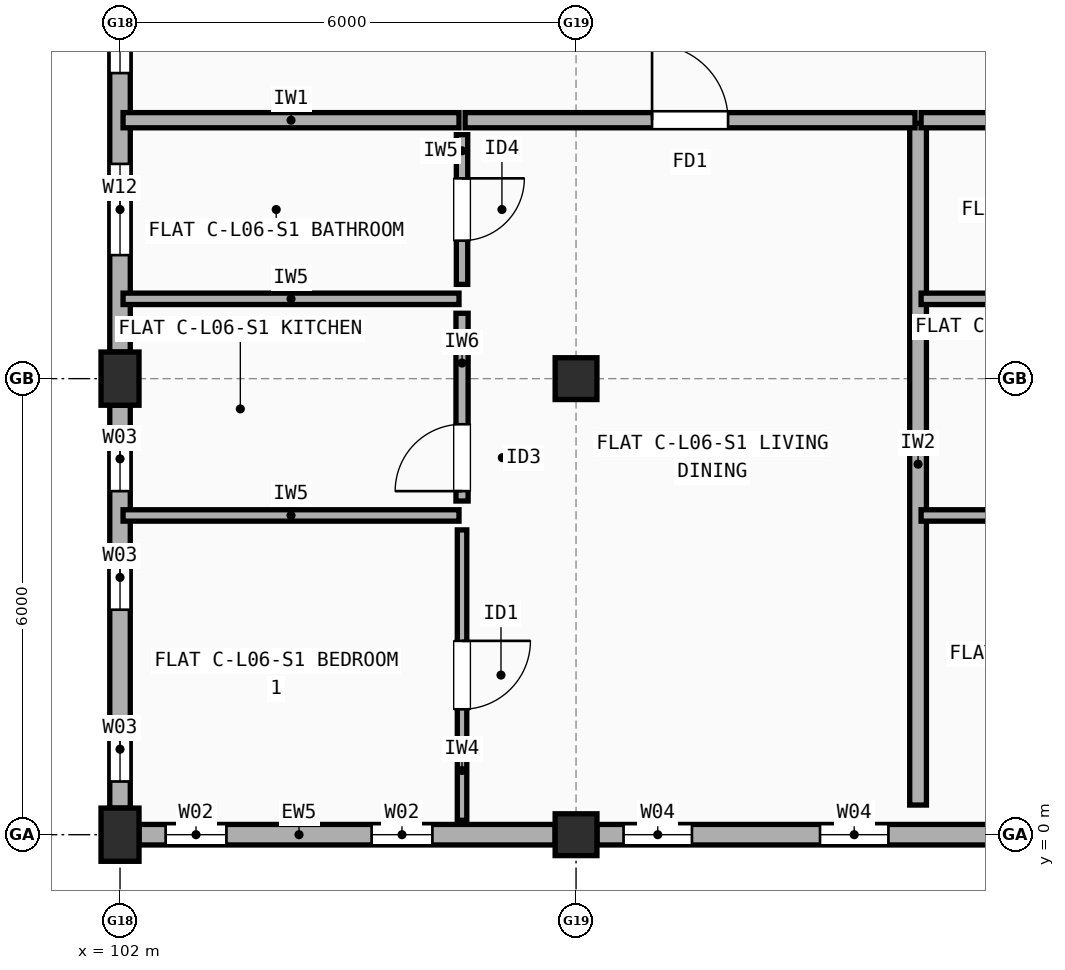
"""IFC4 building model, lengths in metres.
Left out: names, types, materials, properties, quantities, classifications, styles, units other than length and angle.
Written with IfcOpenShell. Run it as: python <this file> out.ifc"""

import sys

from ifc_helpers import new_model, si_unit, direction, frame, frame_2d, origin, origin_2d, place, context, subcontext, project, spatial, rectangle, extrude, element, fill, save


model = new_model("IFC4")
c1 = context("Model", 3, precision=1e-05, world=origin(), true_north=direction((0.0, 1.0)))
c2 = subcontext(c1, "Body", "Model", "MODEL_VIEW")
j1 = project(units=[si_unit("LENGTHUNIT", "METRE"), si_unit("PLANEANGLEUNIT", "RADIAN")], contexts=[c1])
p1 = place(None, origin())
s1 = spatial("IfcSite", under=j1, at=p1, CompositionType="ELEMENT")
p2 = place(p1, origin())
s2 = spatial("IfcBuilding", under=s1, at=p2, CompositionType="ELEMENT")
p3 = place(p2, frame((0.0, 0.0, 20.5)))
s3 = spatial("IfcBuildingStorey", under=s2, at=p3, CompositionType="ELEMENT", Elevation=20.5)
for number, where, z_axis, x_axis in (
    (1, (102.0, 0.0, 0.0), (0.0, 0.0, 1.0), (1.0, 0.0, 0.0)),
    (2, (102.0, 6.0, 0.0), (0.0, 0.0, 1.0), (1.0, 0.0, 0.0)),
):
    element("IfcColumn", number, at=place(p3, frame(where, z_axis=z_axis, x_axis=x_axis)), inside=s3, PredefinedType="COLUMN", context=c2, shape_type="SweptSolid", body=[
        extrude(rectangle(XDim=0.5, YDim=0.7, at=origin_2d()), origin(), (0.0, 0.0, 1.0), 2.97),
    ])
for number, where, z_axis, x_axis in (
    (3, (108.0, 0.0, 0.0), (0.0, 0.0, 1.0), (1.0, 0.0, 0.0)),
    (4, (108.0, 6.0, 0.0), (0.0, 0.0, 1.0), (1.0, 0.0, 0.0)),
):
    element("IfcColumn", number, at=place(p3, frame(where, z_axis=z_axis, x_axis=x_axis)), inside=s3, PredefinedType="COLUMN", context=c2, shape_type="SweptSolid", body=[
        extrude(rectangle(XDim=0.55, YDim=0.55, at=origin_2d()), origin(), (0.0, 0.0, 1.0), 2.97),
    ])
p4 = place(p3, frame((102.25, 0.0, 0.0), z_axis=(0.0, 0.0, 1.0), x_axis=(1.0, 0.0, 0.0)))
e5 = element("IfcWall", 5, at=p4, inside=s3, PredefinedType="STANDARD", context=c2, shape_type="SweptSolid", body=[
    extrude(rectangle(XDim=5.475, YDim=0.27, at=frame_2d((2.738, 0.0))), origin(), (0.0, 0.0, 1.0), 2.452),
])
p5 = place(p4, frame((0.35, 0.0, 0.9)))
e6 = element("IfcOpeningElement", 6, at=p5, cuts=e5, PredefinedType="OPENING", context=c2, shape_type="SweptSolid", body=[
    extrude(rectangle(XDim=0.8, YDim=1.2, at=frame_2d((0.4, 0.6))), frame((0.0, 0.145, 0.0), z_axis=(0.0, -1.0, 0.0), x_axis=(1.0, 0.0, 0.0)), (0.0, 0.0, 1.0), 0.29),
])
p6 = place(p4, frame((3.06, 0.0, 0.9)))
e7 = element("IfcOpeningElement", 7, at=p6, cuts=e5, PredefinedType="OPENING", context=c2, shape_type="SweptSolid", body=[
    extrude(rectangle(XDim=0.8, YDim=1.2, at=frame_2d((0.4, 0.6))), frame((0.0, 0.145, 0.0), z_axis=(0.0, -1.0, 0.0), x_axis=(1.0, 0.0, 0.0)), (0.0, 0.0, 1.0), 0.29),
])
p7 = place(p3, frame((108.275, 0.0, 0.0), z_axis=(0.0, 0.0, 1.0), x_axis=(1.0, 0.0, 0.0)))
e8 = element("IfcWall", 8, at=p7, inside=s3, PredefinedType="STANDARD", context=c2, shape_type="SweptSolid", body=[
    extrude(rectangle(XDim=5.45, YDim=0.27, at=frame_2d((2.725, 0.0))), origin(), (0.0, 0.0, 1.0), 2.452),
])
p8 = place(p7, frame((0.35, 0.0, 0.9)))
e9 = element("IfcOpeningElement", 9, at=p8, cuts=e8, PredefinedType="OPENING", context=c2, shape_type="SweptSolid", body=[
    extrude(rectangle(XDim=0.9, YDim=1.3, at=frame_2d((0.45, 0.65))), frame((0.0, 0.145, 0.0), z_axis=(0.0, -1.0, 0.0), x_axis=(1.0, 0.0, 0.0)), (0.0, 0.0, 1.0), 0.29),
])
p9 = place(p7, frame((2.935, 0.0, 0.9)))
e10 = element("IfcOpeningElement", 10, at=p9, cuts=e8, PredefinedType="OPENING", context=c2, shape_type="SweptSolid", body=[
    extrude(rectangle(XDim=0.9, YDim=1.3, at=frame_2d((0.45, 0.65))), frame((0.0, 0.145, 0.0), z_axis=(0.0, -1.0, 0.0), x_axis=(1.0, 0.0, 0.0)), (0.0, 0.0, 1.0), 0.29),
])
p10 = place(p3, frame((102.0, 11.65, 0.0), z_axis=(0.0, 0.0, 1.0), x_axis=(0.0, -1.0, 0.0)))
e11 = element("IfcWall", 11, at=p10, inside=s3, PredefinedType="STANDARD", context=c2, shape_type="SweptSolid", body=[
    extrude(rectangle(XDim=5.3, YDim=0.27, at=frame_2d((2.65, 0.0))), origin(), (0.0, 0.0, 1.0), 2.452),
])
p11 = place(p10, frame((0.58, 0.0, 0.9)))
e12 = element("IfcOpeningElement", 12, at=p11, cuts=e11, PredefinedType="OPENING", context=c2, shape_type="SweptSolid", body=[
    extrude(rectangle(XDim=1.05, YDim=1.35, at=frame_2d((0.525, 0.675))), frame((0.0, 0.145, 0.0), z_axis=(0.0, -1.0, 0.0), x_axis=(1.0, 0.0, 0.0)), (0.0, 0.0, 1.0), 0.29),
])
p12 = place(p10, frame((2.825, 0.0, 0.9)))
e13 = element("IfcOpeningElement", 13, at=p12, cuts=e11, PredefinedType="OPENING", context=c2, shape_type="SweptSolid", body=[
    extrude(rectangle(XDim=1.2, YDim=1.35, at=frame_2d((0.6, 0.675))), frame((0.0, 0.145, 0.0), z_axis=(0.0, -1.0, 0.0), x_axis=(1.0, 0.0, 0.0)), (0.0, 0.0, 1.0), 0.29),
])
p13 = place(p3, frame((102.0, 5.65, 0.0), z_axis=(0.0, 0.0, 1.0), x_axis=(0.0, -1.0, 0.0)))
e14 = element("IfcWall", 14, at=p13, inside=s3, PredefinedType="STANDARD", context=c2, shape_type="SweptSolid", body=[
    extrude(rectangle(XDim=5.3, YDim=0.27, at=frame_2d((2.65, 0.0))), origin(), (0.0, 0.0, 1.0), 2.452),
])
p14 = place(p13, frame((0.28, 0.0, 0.9)))
e15 = element("IfcOpeningElement", 15, at=p14, cuts=e14, PredefinedType="OPENING", context=c2, shape_type="SweptSolid", body=[
    extrude(rectangle(XDim=0.85, YDim=1.25, at=frame_2d((0.425, 0.625))), frame((0.0, 0.145, 0.0), z_axis=(0.0, -1.0, 0.0), x_axis=(1.0, 0.0, 0.0)), (0.0, 0.0, 1.0), 0.29),
])
p15 = place(p13, frame((1.84, 0.0, 0.9)))
e16 = element("IfcOpeningElement", 16, at=p15, cuts=e14, PredefinedType="OPENING", context=c2, shape_type="SweptSolid", body=[
    extrude(rectangle(XDim=0.85, YDim=1.25, at=frame_2d((0.425, 0.625))), frame((0.0, 0.145, 0.0), z_axis=(0.0, -1.0, 0.0), x_axis=(1.0, 0.0, 0.0)), (0.0, 0.0, 1.0), 0.29),
])
p16 = place(p13, frame((4.1, 0.0, 0.9)))
e17 = element("IfcOpeningElement", 17, at=p16, cuts=e14, PredefinedType="OPENING", context=c2, shape_type="SweptSolid", body=[
    extrude(rectangle(XDim=0.85, YDim=1.25, at=frame_2d((0.425, 0.625))), frame((0.0, 0.145, 0.0), z_axis=(0.0, -1.0, 0.0), x_axis=(1.0, 0.0, 0.0)), (0.0, 0.0, 1.0), 0.29),
])
p17 = place(p3, frame((112.5, 0.39, 0.0), z_axis=(0.0, 0.0, 1.0), x_axis=(0.0, 1.0, 0.0)))
e18 = element("IfcWall", 18, at=p17, inside=s3, PredefinedType="SOLIDWALL", context=c2, shape_type="SweptSolid", body=[
    extrude(rectangle(XDim=8.97, YDim=0.22, at=frame_2d((4.485, 0.0))), origin(), (0.0, 0.0, 1.0), 2.452),
])
p18 = place(p3, frame((102.04, 9.4, 0.0), z_axis=(0.0, 0.0, 1.0), x_axis=(1.0, 0.0, 0.0)))
e19 = element("IfcWall", 19, at=p18, inside=s3, PredefinedType="SOLIDWALL", context=c2, shape_type="SweptSolid", body=[
    extrude(rectangle(XDim=4.42, YDim=0.2, at=frame_2d((2.21, 0.0))), origin(), (0.0, 0.0, 1.0), 2.452),
])
p19 = place(p3, frame((106.54, 9.4, 0.0), z_axis=(0.0, 0.0, 1.0), x_axis=(1.0, 0.0, 0.0)))
e20 = element("IfcWall", 20, at=p19, inside=s3, PredefinedType="SOLIDWALL", context=c2, shape_type="SweptSolid", body=[
    extrude(rectangle(XDim=5.92, YDim=0.2, at=frame_2d((2.96, 0.0))), origin(), (0.0, 0.0, 1.0), 2.548),
])
p20 = place(p19, frame((2.46, 0.0, 0.0)))
e21 = element("IfcOpeningElement", 21, at=p20, cuts=e20, PredefinedType="OPENING", context=c2, shape_type="SweptSolid", body=[
    extrude(rectangle(XDim=1.0, YDim=2.15, at=frame_2d((0.5, 1.075))), frame((0.0, 0.11, 0.0), z_axis=(0.0, -1.0, 0.0), x_axis=(1.0, 0.0, 0.0)), (0.0, 0.0, 1.0), 0.22),
])
p21 = place(p3, frame((106.5, 0.19, 0.0), z_axis=(0.0, 0.0, 1.0), x_axis=(0.0, 1.0, 0.0)))
e22 = element("IfcWall", 22, at=p21, inside=s3, PredefinedType="PARTITIONING", context=c2, shape_type="SweptSolid", body=[
    extrude(rectangle(XDim=3.82, YDim=0.125, at=frame_2d((1.91, 0.0))), origin(), (0.0, 0.0, 1.0), 2.97),
])
p22 = place(p21, frame((1.46, 0.0, 0.0)))
e23 = element("IfcOpeningElement", 23, at=p22, cuts=e22, PredefinedType="OPENING", context=c2, shape_type="SweptSolid", body=[
    extrude(rectangle(XDim=0.9, YDim=2.1, at=frame_2d((0.45, 1.05))), frame((0.0, 0.073, 0.0), z_axis=(0.0, -1.0, 0.0), x_axis=(1.0, 0.0, 0.0)), (0.0, 0.0, 1.0), 0.145),
])
p23 = place(p3, frame((106.5, 4.39, 0.0), z_axis=(0.0, 0.0, 1.0), x_axis=(0.0, 1.0, 0.0)))
e24 = element("IfcWall", 24, at=p23, inside=s3, PredefinedType="PLUMBINGWALL", context=c2, shape_type="SweptSolid", body=[
    extrude(rectangle(XDim=2.47, YDim=0.16, at=frame_2d((1.235, 0.0))), origin(), (0.0, 0.0, 1.0), 2.452),
])
p24 = place(p23, frame((0.13, 0.0, 0.0)))
e25 = element("IfcOpeningElement", 25, at=p24, cuts=e24, PredefinedType="OPENING", context=c2, shape_type="SweptSolid", body=[
    extrude(rectangle(XDim=0.88, YDim=2.1, at=frame_2d((0.44, 1.05))), frame((0.0, 0.09, 0.0), z_axis=(0.0, -1.0, 0.0), x_axis=(1.0, 0.0, 0.0)), (0.0, 0.0, 1.0), 0.18),
])
p25 = place(p3, frame((106.5, 7.24, 0.0), z_axis=(0.0, 0.0, 1.0), x_axis=(0.0, 1.0, 0.0)))
e26 = element("IfcWall", 26, at=p25, inside=s3, PredefinedType="PARTITIONING", context=c2, shape_type="SweptSolid", body=[
    extrude(rectangle(XDim=1.97, YDim=0.15, at=frame_2d((0.985, 0.0))), origin(), (0.0, 0.0, 1.0), 2.97),
])
p26 = place(p25, frame((0.575, 0.0, 0.0)))
e27 = element("IfcOpeningElement", 27, at=p26, cuts=e26, PredefinedType="OPENING", context=c2, shape_type="SweptSolid", body=[
    extrude(rectangle(XDim=0.82, YDim=2.08, at=frame_2d((0.41, 1.04))), frame((0.0, 0.085, 0.0), z_axis=(0.0, -1.0, 0.0), x_axis=(1.0, 0.0, 0.0)), (0.0, 0.0, 1.0), 0.17),
])
for number, where, z_axis, x_axis in (
    (28, (102.04, 4.2, 0.0), (0.0, 0.0, 1.0), (1.0, 0.0, 0.0)),
    (29, (102.04, 7.05, 0.0), (0.0, 0.0, 1.0), (1.0, 0.0, 0.0)),
):
    element("IfcWall", number, at=place(p3, frame(where, z_axis=z_axis, x_axis=x_axis)), inside=s3, PredefinedType="PARTITIONING", context=c2, shape_type="SweptSolid", body=[
        extrude(rectangle(XDim=4.42, YDim=0.15, at=frame_2d((2.21, 0.0))), origin(), (0.0, 0.0, 1.0), 2.452),
    ])
p27 = place(p3, frame((112.54, 9.4, 0.0), z_axis=(0.0, 0.0, 1.0), x_axis=(1.0, 0.0, 0.0)))
e30 = element("IfcWall", 30, at=p27, inside=s3, PredefinedType="SOLIDWALL", context=c2, shape_type="SweptSolid", body=[
    extrude(rectangle(XDim=4.42, YDim=0.2, at=frame_2d((2.21, 0.0))), origin(), (0.0, 0.0, 1.0), 2.548),
])
p28 = place(p3, frame((112.54, 4.2, 0.0), z_axis=(0.0, 0.0, 1.0), x_axis=(1.0, 0.0, 0.0)))
e31 = element("IfcWall", 31, at=p28, inside=s3, PredefinedType="PARTITIONING", context=c2, shape_type="SweptSolid", body=[
    extrude(rectangle(XDim=4.42, YDim=0.15, at=frame_2d((2.21, 0.0))), origin(), (0.0, 0.0, 1.0), 2.458),
])
p29 = place(p3, frame((112.54, 7.05, 0.0), z_axis=(0.0, 0.0, 1.0), x_axis=(1.0, 0.0, 0.0)))
e32 = element("IfcWall", 32, at=p29, inside=s3, PredefinedType="PARTITIONING", context=c2, shape_type="SweptSolid", body=[
    extrude(rectangle(XDim=4.42, YDim=0.15, at=frame_2d((2.21, 0.0))), origin(), (0.0, 0.0, 1.0), 2.548),
])
p30 = place(p5, origin())
e33 = element("IfcWindow", 33, at=p30, inside=s3, PartitioningType="SINGLE_PANEL", PredefinedType="WINDOW", context=c2, shape_type="SweptSolid", body=[
    extrude(rectangle(XDim=0.8, YDim=1.2, at=frame_2d((0.4, 0.6))), frame((0.0, 0.03, 0.0), z_axis=(0.0, -1.0, 0.0), x_axis=(1.0, 0.0, 0.0)), (0.0, 0.0, 1.0), 0.06),
])
fill(e6, e33)
p31 = place(p6, origin())
e34 = element("IfcWindow", 34, at=p31, inside=s3, PartitioningType="SINGLE_PANEL", PredefinedType="WINDOW", context=c2, shape_type="SweptSolid", body=[
    extrude(rectangle(XDim=0.8, YDim=1.2, at=frame_2d((0.4, 0.6))), frame((0.0, 0.03, 0.0), z_axis=(0.0, -1.0, 0.0), x_axis=(1.0, 0.0, 0.0)), (0.0, 0.0, 1.0), 0.06),
])
fill(e7, e34)
p32 = place(p8, origin())
e35 = element("IfcWindow", 35, at=p32, inside=s3, PartitioningType="SINGLE_PANEL", PredefinedType="WINDOW", context=c2, shape_type="SweptSolid", body=[
    extrude(rectangle(XDim=0.9, YDim=1.3, at=frame_2d((0.45, 0.65))), frame((0.0, 0.03, 0.0), z_axis=(0.0, -1.0, 0.0), x_axis=(1.0, 0.0, 0.0)), (0.0, 0.0, 1.0), 0.06),
])
fill(e9, e35)
p33 = place(p9, origin())
e36 = element("IfcWindow", 36, at=p33, inside=s3, PartitioningType="SINGLE_PANEL", PredefinedType="WINDOW", context=c2, shape_type="SweptSolid", body=[
    extrude(rectangle(XDim=0.9, YDim=1.3, at=frame_2d((0.45, 0.65))), frame((0.0, 0.03, 0.0), z_axis=(0.0, -1.0, 0.0), x_axis=(1.0, 0.0, 0.0)), (0.0, 0.0, 1.0), 0.06),
])
fill(e10, e36)
p34 = place(p11, origin())
e37 = element("IfcWindow", 37, at=p34, inside=s3, PartitioningType="SINGLE_PANEL", PredefinedType="WINDOW", context=c2, shape_type="SweptSolid", body=[
    extrude(rectangle(XDim=1.05, YDim=1.35, at=frame_2d((0.525, 0.675))), frame((0.0, 0.03, 0.0), z_axis=(0.0, -1.0, 0.0), x_axis=(1.0, 0.0, 0.0)), (0.0, 0.0, 1.0), 0.06),
])
fill(e12, e37)
p35 = place(p12, origin())
e38 = element("IfcWindow", 38, at=p35, inside=s3, PartitioningType="SINGLE_PANEL", PredefinedType="WINDOW", context=c2, shape_type="SweptSolid", body=[
    extrude(rectangle(XDim=1.2, YDim=1.35, at=frame_2d((0.6, 0.675))), frame((0.0, 0.03, 0.0), z_axis=(0.0, -1.0, 0.0), x_axis=(1.0, 0.0, 0.0)), (0.0, 0.0, 1.0), 0.06),
])
fill(e13, e38)
p36 = place(p14, origin())
e39 = element("IfcWindow", 39, at=p36, inside=s3, PartitioningType="SINGLE_PANEL", PredefinedType="WINDOW", context=c2, shape_type="SweptSolid", body=[
    extrude(rectangle(XDim=0.85, YDim=1.25, at=frame_2d((0.425, 0.625))), frame((0.0, 0.03, 0.0), z_axis=(0.0, -1.0, 0.0), x_axis=(1.0, 0.0, 0.0)), (0.0, 0.0, 1.0), 0.06),
])
fill(e15, e39)
p37 = place(p15, origin())
e40 = element("IfcWindow", 40, at=p37, inside=s3, PartitioningType="SINGLE_PANEL", PredefinedType="WINDOW", context=c2, shape_type="SweptSolid", body=[
    extrude(rectangle(XDim=0.85, YDim=1.25, at=frame_2d((0.425, 0.625))), frame((0.0, 0.03, 0.0), z_axis=(0.0, -1.0, 0.0), x_axis=(1.0, 0.0, 0.0)), (0.0, 0.0, 1.0), 0.06),
])
fill(e16, e40)
p38 = place(p16, origin())
e41 = element("IfcWindow", 41, at=p38, inside=s3, PartitioningType="SINGLE_PANEL", PredefinedType="WINDOW", context=c2, shape_type="SweptSolid", body=[
    extrude(rectangle(XDim=0.85, YDim=1.25, at=frame_2d((0.425, 0.625))), frame((0.0, 0.03, 0.0), z_axis=(0.0, -1.0, 0.0), x_axis=(1.0, 0.0, 0.0)), (0.0, 0.0, 1.0), 0.06),
])
fill(e17, e41)
p39 = place(p20, origin())
e42 = element("IfcDoor", 42, at=p39, inside=s3, OperationType="SINGLE_SWING_LEFT", PredefinedType="DOOR", context=c2, shape_type="SweptSolid", body=[
    extrude(rectangle(XDim=1.0, YDim=2.15, at=frame_2d((0.5, 1.075))), frame((0.0, 0.025, 0.0), z_axis=(0.0, -1.0, 0.0), x_axis=(1.0, 0.0, 0.0)), (0.0, 0.0, 1.0), 0.05),
])
fill(e21, e42)
p40 = place(p22, origin())
e43 = element("IfcDoor", 43, at=p40, inside=s3, OperationType="SINGLE_SWING_RIGHT", PredefinedType="DOOR", context=c2, shape_type="SweptSolid", body=[
    extrude(rectangle(XDim=0.9, YDim=2.1, at=frame_2d((0.45, 1.05))), frame((0.0, 0.025, 0.0), z_axis=(0.0, -1.0, 0.0), x_axis=(1.0, 0.0, 0.0)), (0.0, 0.0, 1.0), 0.05),
])
fill(e23, e43)
p41 = place(p24, origin())
e44 = element("IfcDoor", 44, at=p41, inside=s3, OperationType="SINGLE_SWING_LEFT", PredefinedType="DOOR", context=c2, shape_type="SweptSolid", body=[
    extrude(rectangle(XDim=0.88, YDim=2.1, at=frame_2d((0.44, 1.05))), frame((0.0, 0.025, 0.0), z_axis=(0.0, -1.0, 0.0), x_axis=(1.0, 0.0, 0.0)), (0.0, 0.0, 1.0), 0.05),
])
fill(e25, e44)
p42 = place(p26, origin())
e45 = element("IfcDoor", 45, at=p42, inside=s3, OperationType="SINGLE_SWING_RIGHT", PredefinedType="DOOR", context=c2, shape_type="SweptSolid", body=[
    extrude(rectangle(XDim=0.82, YDim=2.08, at=frame_2d((0.41, 1.04))), frame((0.0, 0.025, 0.0), z_axis=(0.0, -1.0, 0.0), x_axis=(1.0, 0.0, 0.0)), (0.0, 0.0, 1.0), 0.05),
])
fill(e27, e45)
save(model, sys.argv[1])
